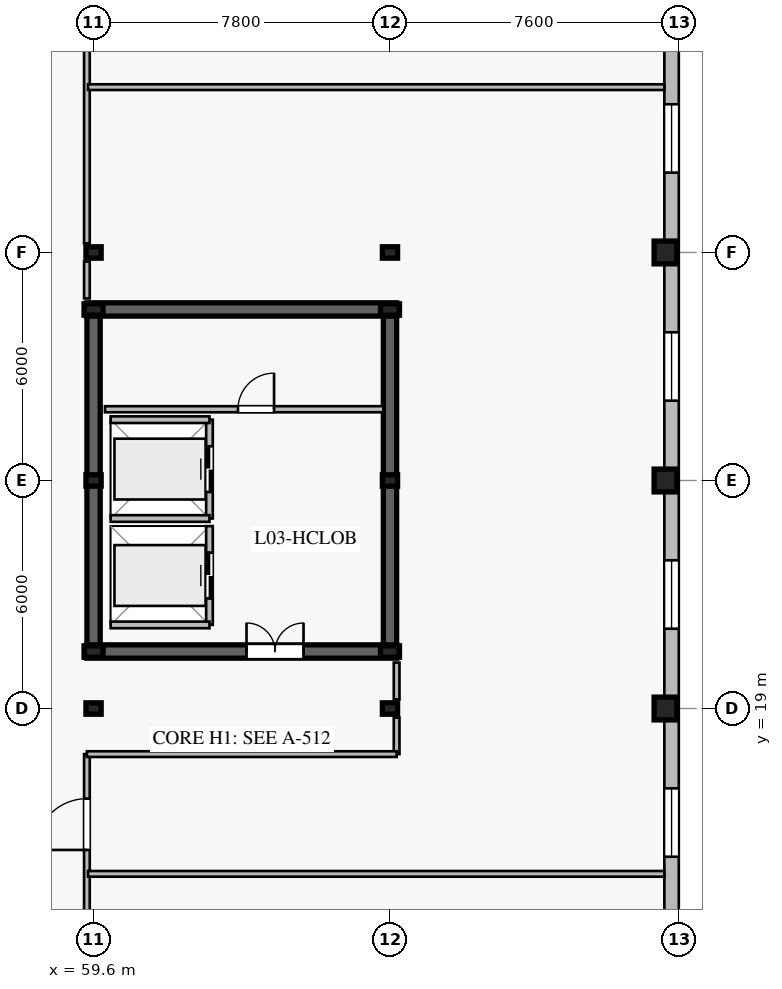
"""IFC4 building model, lengths in metres.
Left out: names, types, materials, properties, quantities, classifications, styles, units other than length and angle.
Written with IfcOpenShell. Run it as: python <this file> out.ifc"""

import sys

from ifc_helpers import new_model, si_unit, direction, frame, frame_2d, origin, origin_2d, place, context, subcontext, project, spatial, rectangle, i_section, extrude, element, fill, save


model = new_model("IFC4")
c1 = context("Model", 3, precision=1e-05, world=origin(), true_north=direction((0.0, 1.0)))
c2 = subcontext(c1, "Body", "Model", "MODEL_VIEW")
j1 = project(units=[si_unit("LENGTHUNIT", "METRE"), si_unit("PLANEANGLEUNIT", "RADIAN")], contexts=[c1])
p1 = place(None, origin())
s1 = spatial("IfcSite", under=j1, at=p1, CompositionType="ELEMENT")
p2 = place(p1, origin())
s2 = spatial("IfcBuilding", under=s1, at=p2, CompositionType="ELEMENT")
p3 = place(p2, frame((0.0, 0.0, 14.4)))
s3 = spatial("IfcBuildingStorey", under=s2, at=p3, CompositionType="ELEMENT", Elevation=14.4)
p4 = place(p3, frame((59.425, 20.5, 0.0), z_axis=(0.0, 0.0, 1.0), x_axis=(1.0, 0.0, 0.0)))
e1 = element("IfcWall", 1, at=p4, inside=s3, PredefinedType="SHEAR", context=c2, shape_type="SweptSolid", body=[
    extrude(rectangle(XDim=8.15, YDim=0.35, at=frame_2d((4.075, 0.0))), origin(), (0.0, 0.0, 1.0), 4.3),
])
p5 = place(p4, frame((4.2, 0.0, 0.0)))
e2 = element("IfcOpeningElement", 2, at=p5, cuts=e1, PredefinedType="OPENING", context=c2, shape_type="SweptSolid", body=[
    extrude(rectangle(XDim=1.5, YDim=2.2, at=frame_2d((0.75, 1.1))), frame((0.0, 0.185, 0.0), z_axis=(0.0, -1.0, 0.0), x_axis=(1.0, 0.0, 0.0)), (0.0, 0.0, 1.0), 0.37),
])
p6 = place(p3, frame((67.575, 29.5, 0.0), z_axis=(0.0, 0.0, 1.0), x_axis=(-1.0, 0.0, 0.0)))
e3 = element("IfcWall", 3, at=p6, inside=s3, PredefinedType="SHEAR", context=c2, shape_type="SweptSolid", body=[
    extrude(rectangle(XDim=8.15, YDim=0.35, at=frame_2d((4.075, 0.0))), origin(), (0.0, 0.0, 1.0), 4.3),
])
for number, where, z_axis, x_axis in (
    (4, (59.6, 29.325, 0.0), (0.0, 0.0, 1.0), (0.0, -1.0, 0.0)),
    (5, (67.4, 20.675, 0.0), (0.0, 0.0, 1.0), (0.0, 1.0, 0.0)),
):
    element("IfcWall", number, at=place(p3, frame(where, z_axis=z_axis, x_axis=x_axis)), inside=s3, PredefinedType="SHEAR", context=c2, shape_type="SweptSolid", body=[
        extrude(rectangle(XDim=8.65, YDim=0.35, at=frame_2d((4.325, 0.0))), origin(), (0.0, 0.0, 1.0), 4.3),
    ])
for number, where, z_axis, x_axis in (
    (6, (59.6, 20.5, 0.0), (0.0, 0.0, 1.0), (1.0, 0.0, 0.0)),
    (7, (67.4, 20.5, 0.0), (0.0, 0.0, 1.0), (1.0, 0.0, 0.0)),
    (8, (67.4, 29.5, 0.0), (0.0, 0.0, 1.0), (1.0, 0.0, 0.0)),
    (9, (59.6, 29.5, 0.0), (0.0, 0.0, 1.0), (1.0, 0.0, 0.0)),
):
    element("IfcColumn", number, at=place(p3, frame(where, z_axis=z_axis, x_axis=x_axis)), inside=s3, PredefinedType="COLUMN", context=c2, shape_type="SweptSolid", body=[
        extrude(i_section(OverallWidth=0.3, OverallDepth=0.5, WebThickness=0.014, FlangeThickness=0.028, at=origin_2d()), origin(), (0.0, 0.0, 1.0), 4.6),
    ])
for number, where, z_axis, x_axis in (
    (10, (59.6, 19.0, 0.0), (0.0, 0.0, 1.0), (1.0, 0.0, 0.0)),
    (11, (59.6, 25.0, 0.0), (0.0, 0.0, 1.0), (1.0, 0.0, 0.0)),
    (12, (59.6, 31.0, 0.0), (0.0, 0.0, 1.0), (1.0, 0.0, 0.0)),
    (13, (67.4, 19.0, 0.0), (0.0, 0.0, 1.0), (1.0, 0.0, 0.0)),
    (14, (67.4, 25.0, 0.0), (0.0, 0.0, 1.0), (1.0, 0.0, 0.0)),
    (15, (67.4, 31.0, 0.0), (0.0, 0.0, 1.0), (1.0, 0.0, 0.0)),
):
    element("IfcColumn", number, at=place(p3, frame(where, z_axis=z_axis, x_axis=x_axis)), inside=s3, PredefinedType="COLUMN", context=c2, shape_type="SweptSolid", body=[
        extrude(i_section(OverallWidth=0.3, OverallDepth=0.4, WebThickness=0.013, FlangeThickness=0.024, at=origin_2d()), origin(), (0.0, 0.0, 1.0), 4.6),
    ])
for number, where, z_axis, x_axis in (
    (16, (74.65, 19.0, 0.0), (0.0, 0.0, 1.0), (1.0, 0.0, 0.0)),
    (17, (74.65, 25.0, 0.0), (0.0, 0.0, 1.0), (1.0, 0.0, 0.0)),
    (18, (74.65, 31.0, 0.0), (0.0, 0.0, 1.0), (1.0, 0.0, 0.0)),
):
    element("IfcColumn", number, at=place(p3, frame(where, z_axis=z_axis, x_axis=x_axis)), inside=s3, PredefinedType="COLUMN", context=c2, shape_type="SweptSolid", body=[
        extrude(rectangle(XDim=0.6, YDim=0.6, at=origin_2d()), origin(), (0.0, 0.0, 1.0), 4.6),
    ])
p7 = place(p3, frame((74.81, 42.62, 0.0), z_axis=(0.0, 0.0, 1.0), x_axis=(0.0, -1.0, 0.0)))
e19 = element("IfcWall", 19, at=p7, inside=s3, PredefinedType="STANDARD", context=c2, shape_type="SweptSolid", body=[
    extrude(rectangle(XDim=35.24, YDim=0.38, at=frame_2d((17.62, 0.0))), origin(), (0.0, 0.0, 1.0), 4.3),
])
p8 = place(p7, frame((31.52, 0.0, 0.9)))
e20 = element("IfcOpeningElement", 20, at=p8, cuts=e19, PredefinedType="OPENING", context=c2, shape_type="SweptSolid", body=[
    extrude(rectangle(XDim=1.8, YDim=1.8, at=frame_2d((0.9, 0.9))), frame((0.0, 0.2, 0.0), z_axis=(0.0, -1.0, 0.0), x_axis=(1.0, 0.0, 0.0)), (0.0, 0.0, 1.0), 0.4),
])
p9 = place(p7, frame((25.72, 0.0, 0.9)))
e21 = element("IfcOpeningElement", 21, at=p9, cuts=e19, PredefinedType="OPENING", context=c2, shape_type="SweptSolid", body=[
    extrude(rectangle(XDim=1.8, YDim=1.8, at=frame_2d((0.9, 0.9))), frame((0.0, 0.2, 0.0), z_axis=(0.0, -1.0, 0.0), x_axis=(1.0, 0.0, 0.0)), (0.0, 0.0, 1.0), 0.4),
])
p10 = place(p7, frame((19.72, 0.0, 0.9)))
e22 = element("IfcOpeningElement", 22, at=p10, cuts=e19, PredefinedType="OPENING", context=c2, shape_type="SweptSolid", body=[
    extrude(rectangle(XDim=1.8, YDim=1.8, at=frame_2d((0.9, 0.9))), frame((0.0, 0.2, 0.0), z_axis=(0.0, -1.0, 0.0), x_axis=(1.0, 0.0, 0.0)), (0.0, 0.0, 1.0), 0.4),
])
p11 = place(p7, frame((13.72, 0.0, 0.9)))
e23 = element("IfcOpeningElement", 23, at=p11, cuts=e19, PredefinedType="OPENING", context=c2, shape_type="SweptSolid", body=[
    extrude(rectangle(XDim=1.8, YDim=1.8, at=frame_2d((0.9, 0.9))), frame((0.0, 0.2, 0.0), z_axis=(0.0, -1.0, 0.0), x_axis=(1.0, 0.0, 0.0)), (0.0, 0.0, 1.0), 0.4),
])
p12 = place(p7, frame((7.72, 0.0, 0.9)))
e24 = element("IfcOpeningElement", 24, at=p12, cuts=e19, PredefinedType="OPENING", context=c2, shape_type="SweptSolid", body=[
    extrude(rectangle(XDim=1.8, YDim=1.8, at=frame_2d((0.9, 0.9))), frame((0.0, 0.2, 0.0), z_axis=(0.0, -1.0, 0.0), x_axis=(1.0, 0.0, 0.0)), (0.0, 0.0, 1.0), 0.4),
])
p13 = place(p7, frame((1.92, 0.0, 0.9)))
e25 = element("IfcOpeningElement", 25, at=p13, cuts=e19, PredefinedType="OPENING", context=c2, shape_type="SweptSolid", body=[
    extrude(rectangle(XDim=1.8, YDim=1.8, at=frame_2d((0.9, 0.9))), frame((0.0, 0.2, 0.0), z_axis=(0.0, -1.0, 0.0), x_axis=(1.0, 0.0, 0.0)), (0.0, 0.0, 1.0), 0.4),
])
p14 = place(p3, frame((62.65, 21.2, 0.0), z_axis=(0.0, 0.0, 1.0), x_axis=(0.0, 1.0, 0.0)))
e26 = element("IfcWall", 26, at=p14, inside=s3, PredefinedType="PARTITIONING", context=c2, shape_type="SweptSolid", body=[
    extrude(rectangle(XDim=2.6, YDim=0.175, at=frame_2d((1.3, 0.0))), origin(), (0.0, 0.0, 1.0), 4.3),
])
p15 = place(p14, frame((0.7, 0.0, 0.0)))
e27 = element("IfcOpeningElement", 27, at=p15, cuts=e26, PredefinedType="OPENING", context=c2, shape_type="SweptSolid", body=[
    extrude(rectangle(XDim=1.2, YDim=2.2, at=frame_2d((0.6, 1.1))), frame((0.0, 0.098, 0.0), z_axis=(0.0, -1.0, 0.0), x_axis=(1.0, 0.0, 0.0)), (0.0, 0.0, 1.0), 0.195),
])
p16 = place(p3, frame((60.05, 21.2, 0.0), z_axis=(0.0, 0.0, 1.0), x_axis=(1.0, 0.0, 0.0)))
e28 = element("IfcWall", 28, at=p16, inside=s3, PredefinedType="PARTITIONING", context=c2, shape_type="SweptSolid", body=[
    extrude(rectangle(XDim=2.6, YDim=0.175, at=frame_2d((1.3, 0.0))), origin(), (0.0, 0.0, 1.0), 4.3),
])
p17 = place(p3, frame((62.65, 24.0, 0.0), z_axis=(0.0, 0.0, 1.0), x_axis=(0.0, 1.0, 0.0)))
e29 = element("IfcWall", 29, at=p17, inside=s3, PredefinedType="PARTITIONING", context=c2, shape_type="SweptSolid", body=[
    extrude(rectangle(XDim=2.6, YDim=0.175, at=frame_2d((1.3, 0.0))), origin(), (0.0, 0.0, 1.0), 3.94),
])
p18 = place(p17, frame((0.7, 0.0, 0.0)))
e30 = element("IfcOpeningElement", 30, at=p18, cuts=e29, PredefinedType="OPENING", context=c2, shape_type="SweptSolid", body=[
    extrude(rectangle(XDim=1.2, YDim=2.2, at=frame_2d((0.6, 1.1))), frame((0.0, 0.098, 0.0), z_axis=(0.0, -1.0, 0.0), x_axis=(1.0, 0.0, 0.0)), (0.0, 0.0, 1.0), 0.195),
])
for number, where, z_axis, x_axis in (
    (31, (60.05, 24.0, 0.0), (0.0, 0.0, 1.0), (1.0, 0.0, 0.0)),
    (32, (60.05, 26.6, 0.0), (0.0, 0.0, 1.0), (1.0, 0.0, 0.0)),
):
    element("IfcWall", number, at=place(p3, frame(where, z_axis=z_axis, x_axis=x_axis)), inside=s3, PredefinedType="PARTITIONING", context=c2, shape_type="SweptSolid", body=[
        extrude(rectangle(XDim=2.6, YDim=0.175, at=frame_2d((1.3, 0.0))), origin(), (0.0, 0.0, 1.0), 4.3),
    ])
p19 = place(p3, frame((59.9, 26.875, 0.0), z_axis=(0.0, 0.0, 1.0), x_axis=(1.0, 0.0, 0.0)))
e33 = element("IfcWall", 33, at=p19, inside=s3, PredefinedType="PLUMBINGWALL", context=c2, shape_type="SweptSolid", body=[
    extrude(rectangle(XDim=7.325, YDim=0.16, at=frame_2d((3.663, 0.0))), origin(), (0.0, 0.0, 1.0), 3.94),
])
p20 = place(p19, frame((3.5, 0.0, 0.0)))
e34 = element("IfcOpeningElement", 34, at=p20, cuts=e33, PredefinedType="OPENING", context=c2, shape_type="SweptSolid", body=[
    extrude(rectangle(XDim=0.95, YDim=2.1, at=frame_2d((0.475, 1.05))), frame((0.0, 0.09, 0.0), z_axis=(0.0, -1.0, 0.0), x_axis=(1.0, 0.0, 0.0)), (0.0, 0.0, 1.0), 0.18),
])
p21 = place(p3, frame((59.425, 13.24, 0.0), z_axis=(0.0, 0.0, 1.0), x_axis=(0.0, 1.0, 0.0)))
e35 = element("IfcWall", 35, at=p21, inside=s3, PredefinedType="PARTITIONING", context=c2, shape_type="SweptSolid", body=[
    extrude(rectangle(XDim=4.56, YDim=0.15, at=frame_2d((2.28, 0.0))), origin(), (0.0, 0.0, 1.0), 3.94),
])
p22 = place(p21, frame((2.039, 0.0, 0.0)))
e36 = element("IfcOpeningElement", 36, at=p22, cuts=e35, PredefinedType="OPENING", context=c2, shape_type="SweptSolid", body=[
    extrude(rectangle(XDim=1.35, YDim=2.2, at=frame_2d((0.675, 1.1))), frame((0.0, 0.085, 0.0), z_axis=(0.0, -1.0, 0.0), x_axis=(1.0, 0.0, 0.0)), (0.0, 0.0, 1.0), 0.17),
])
p23 = place(p3, frame((59.425, 29.79, 0.0), z_axis=(0.0, 0.0, 1.0), x_axis=(0.0, 1.0, 0.0)))
e37 = element("IfcWall", 37, at=p23, inside=s3, PredefinedType="PARTITIONING", context=c2, shape_type="SweptSolid", body=[
    extrude(rectangle(XDim=0.97, YDim=0.15, at=frame_2d((0.485, 0.0))), origin(), (0.0, 0.0, 1.0), 3.94),
])
p24 = place(p3, frame((59.425, 31.24, 0.0), z_axis=(0.0, 0.0, 1.0), x_axis=(0.0, 1.0, 0.0)))
e38 = element("IfcWall", 38, at=p24, inside=s3, PredefinedType="PARTITIONING", context=c2, shape_type="SweptSolid", body=[
    extrude(rectangle(XDim=5.52, YDim=0.15, at=frame_2d((2.76, 0.0))), origin(), (0.0, 0.0, 1.0), 3.94),
])
p25 = place(p3, frame((67.575, 17.8, 0.0), z_axis=(0.0, 0.0, 1.0), x_axis=(0.0, 1.0, 0.0)))
e39 = element("IfcWall", 39, at=p25, inside=s3, PredefinedType="PARTITIONING", context=c2, shape_type="SweptSolid", body=[
    extrude(rectangle(XDim=0.96, YDim=0.15, at=frame_2d((0.48, 0.0))), origin(), (0.0, 0.0, 1.0), 3.94),
])
p26 = place(p3, frame((67.575, 19.24, 0.0), z_axis=(0.0, 0.0, 1.0), x_axis=(0.0, 1.0, 0.0)))
e40 = element("IfcWall", 40, at=p26, inside=s3, PredefinedType="PARTITIONING", context=c2, shape_type="SweptSolid", body=[
    extrude(rectangle(XDim=0.97, YDim=0.15, at=frame_2d((0.485, 0.0))), origin(), (0.0, 0.0, 1.0), 3.94),
])
p27 = place(p3, frame((59.425, 17.8, 0.0), z_axis=(0.0, 0.0, 1.0), x_axis=(1.0, 0.0, 0.0)))
e41 = element("IfcWall", 41, at=p27, inside=s3, PredefinedType="PARTITIONING", context=c2, shape_type="SweptSolid", body=[
    extrude(rectangle(XDim=8.15, YDim=0.15, at=frame_2d((4.075, 0.0))), origin(), (0.0, 0.0, 1.0), 3.94),
])
for number, where, z_axis, x_axis in (
    (42, (59.455, 14.65, 0.0), (0.0, 0.0, 1.0), (1.0, 0.0, 0.0)),
    (43, (59.455, 35.35, 0.0), (0.0, 0.0, 1.0), (1.0, 0.0, 0.0)),
):
    element("IfcWall", number, at=place(p3, frame(where, z_axis=z_axis, x_axis=x_axis)), inside=s3, PredefinedType="PARTITIONING", context=c2, shape_type="SweptSolid", body=[
        extrude(rectangle(XDim=15.165, YDim=0.15, at=frame_2d((7.583, 0.0))), origin(), (0.0, 0.0, 1.0), 3.94),
    ])
p28 = place(p9, origin())
e44 = element("IfcWindow", 44, at=p28, inside=s3, PartitioningType="DOUBLE_PANEL_VERTICAL", PredefinedType="WINDOW", context=c2, shape_type="SweptSolid", body=[
    extrude(rectangle(XDim=1.8, YDim=1.8, at=frame_2d((0.9, 0.9))), frame((0.0, 0.03, 0.0), z_axis=(0.0, -1.0, 0.0), x_axis=(1.0, 0.0, 0.0)), (0.0, 0.0, 1.0), 0.06),
])
fill(e21, e44)
p29 = place(p10, origin())
e45 = element("IfcWindow", 45, at=p29, inside=s3, PartitioningType="DOUBLE_PANEL_VERTICAL", PredefinedType="WINDOW", context=c2, shape_type="SweptSolid", body=[
    extrude(rectangle(XDim=1.8, YDim=1.8, at=frame_2d((0.9, 0.9))), frame((0.0, 0.03, 0.0), z_axis=(0.0, -1.0, 0.0), x_axis=(1.0, 0.0, 0.0)), (0.0, 0.0, 1.0), 0.06),
])
fill(e22, e45)
p30 = place(p11, origin())
e46 = element("IfcWindow", 46, at=p30, inside=s3, PartitioningType="DOUBLE_PANEL_VERTICAL", PredefinedType="WINDOW", context=c2, shape_type="SweptSolid", body=[
    extrude(rectangle(XDim=1.8, YDim=1.8, at=frame_2d((0.9, 0.9))), frame((0.0, 0.03, 0.0), z_axis=(0.0, -1.0, 0.0), x_axis=(1.0, 0.0, 0.0)), (0.0, 0.0, 1.0), 0.06),
])
fill(e23, e46)
p31 = place(p12, origin())
e47 = element("IfcWindow", 47, at=p31, inside=s3, PartitioningType="DOUBLE_PANEL_VERTICAL", PredefinedType="WINDOW", context=c2, shape_type="SweptSolid", body=[
    extrude(rectangle(XDim=1.8, YDim=1.8, at=frame_2d((0.9, 0.9))), frame((0.0, 0.03, 0.0), z_axis=(0.0, -1.0, 0.0), x_axis=(1.0, 0.0, 0.0)), (0.0, 0.0, 1.0), 0.06),
])
fill(e24, e47)
p32 = place(p15, origin())
e48 = element("IfcDoor", 48, at=p32, inside=s3, OperationType="DOUBLE_DOOR_SLIDING", PredefinedType="DOOR", context=c2, shape_type="SweptSolid", body=[
    extrude(rectangle(XDim=1.2, YDim=2.2, at=frame_2d((0.6, 1.1))), frame((0.0, 0.025, 0.0), z_axis=(0.0, -1.0, 0.0), x_axis=(1.0, 0.0, 0.0)), (0.0, 0.0, 1.0), 0.05),
])
fill(e27, e48)
p33 = place(p18, origin())
e49 = element("IfcDoor", 49, at=p33, inside=s3, OperationType="DOUBLE_DOOR_SLIDING", PredefinedType="DOOR", context=c2, shape_type="SweptSolid", body=[
    extrude(rectangle(XDim=1.2, YDim=2.2, at=frame_2d((0.6, 1.1))), frame((0.0, 0.025, 0.0), z_axis=(0.0, -1.0, 0.0), x_axis=(1.0, 0.0, 0.0)), (0.0, 0.0, 1.0), 0.05),
])
fill(e30, e49)
p34 = place(p5, origin())
e50 = element("IfcDoor", 50, at=p34, inside=s3, OperationType="DOUBLE_DOOR_SINGLE_SWING", PredefinedType="DOOR", context=c2, shape_type="SweptSolid", body=[
    extrude(rectangle(XDim=1.5, YDim=2.2, at=frame_2d((0.75, 1.1))), frame((0.0, 0.025, 0.0), z_axis=(0.0, -1.0, 0.0), x_axis=(1.0, 0.0, 0.0)), (0.0, 0.0, 1.0), 0.05),
])
fill(e2, e50)
p35 = place(p20, origin())
e51 = element("IfcDoor", 51, at=p35, inside=s3, OperationType="SINGLE_SWING_RIGHT", PredefinedType="DOOR", context=c2, shape_type="SweptSolid", body=[
    extrude(rectangle(XDim=0.95, YDim=2.1, at=frame_2d((0.475, 1.05))), frame((0.0, 0.025, 0.0), z_axis=(0.0, -1.0, 0.0), x_axis=(1.0, 0.0, 0.0)), (0.0, 0.0, 1.0), 0.05),
])
fill(e34, e51)
p36 = place(p22, origin())
e52 = element("IfcDoor", 52, at=p36, inside=s3, OperationType="SINGLE_SWING_LEFT", PredefinedType="DOOR", context=c2, shape_type="SweptSolid", body=[
    extrude(rectangle(XDim=1.35, YDim=2.2, at=frame_2d((0.675, 1.1))), frame((0.0, 0.025, 0.0), z_axis=(0.0, -1.0, 0.0), x_axis=(1.0, 0.0, 0.0)), (0.0, 0.0, 1.0), 0.05),
])
fill(e36, e52)
save(model, sys.argv[1])
